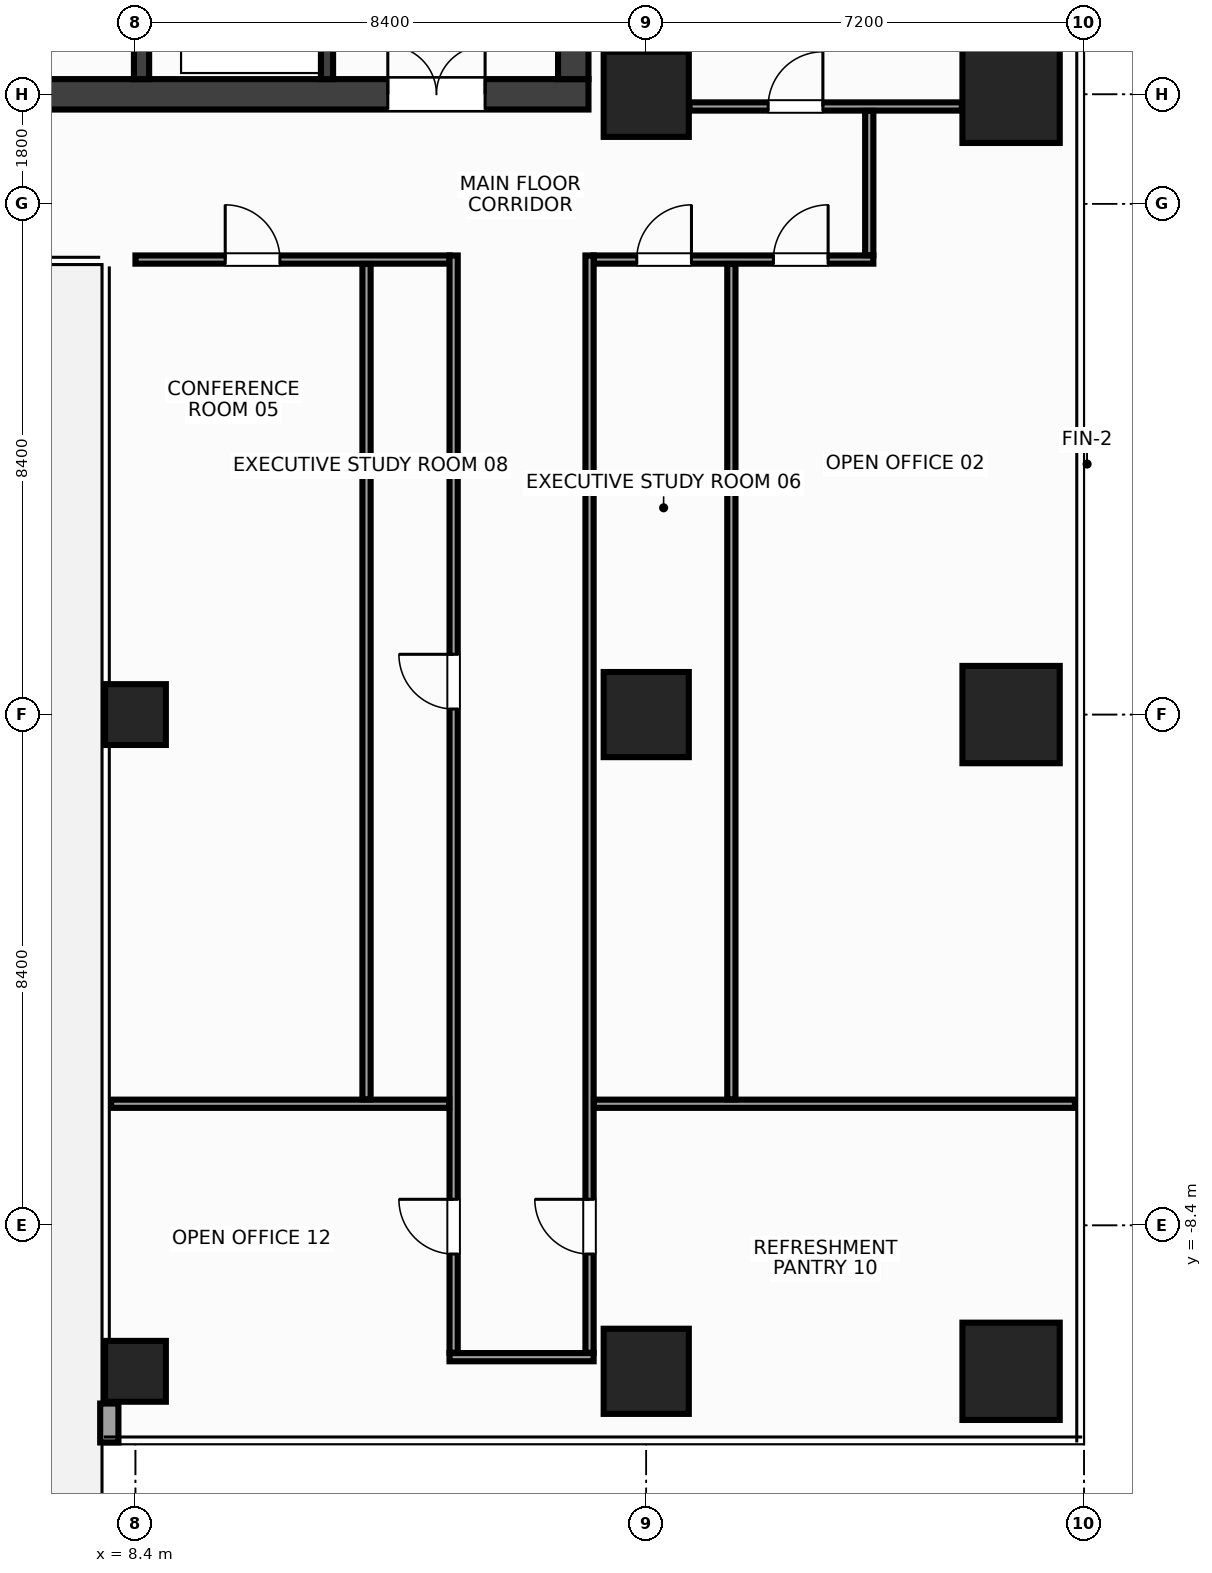
"""IFC4 building model, lengths in metres.
Left out: names, types, materials, properties, quantities, classifications, styles, units other than length and angle.
Written with IfcOpenShell. Run it as: python <this file> out.ifc"""

import sys

from ifc_helpers import new_model, si_unit, direction, frame, frame_2d, origin, origin_2d, place, context, subcontext, project, spatial, rectangle, hollow_rectangle, extrude, source, transform, mapped, element, fill, save


model = new_model("IFC4")
c1 = context("Model", 3, precision=1e-05, world=origin(), true_north=direction((0.0, 1.0)))
c2 = subcontext(c1, "Body", "Model", "MODEL_VIEW")
j1 = project(units=[si_unit("LENGTHUNIT", "METRE"), si_unit("PLANEANGLEUNIT", "RADIAN")], contexts=[c1])
p1 = place(None, origin())
s1 = spatial("IfcSite", under=j1, at=p1, CompositionType="ELEMENT")
p2 = place(p1, origin())
s2 = spatial("IfcBuilding", under=s1, at=p2, CompositionType="ELEMENT")
p3 = place(p2, frame((0.0, 0.0, 196.4)))
s3 = spatial("IfcBuildingStorey", under=s2, at=p3, CompositionType="ELEMENT", Elevation=196.4)
m1 = source(origin(), c2, "Body", "SweptSolid", [
    extrude(rectangle(XDim=31.7, YDim=0.5, at=frame_2d((15.85, 0.0))), origin(), (0.0, 0.0, 1.0), 3.6),
])
p4 = place(p3, frame((-15.85, 10.2, 0.0), z_axis=(0.0, 0.0, 1.0), x_axis=(1.0, 0.0, 0.0)))
e1 = element("IfcWall", 1, at=p4, inside=s3, PredefinedType="SHEAR", context=c2, shape_type="MappedRepresentation", body=[
    mapped(m1, transform((0.0, 0.0, 0.0), x_axis=(1.0, 0.0, 0.0), y_axis=(0.0, 1.0, 0.0), z_axis=(0.0, 0.0, 1.0), scale=1.0)),
])
p5 = place(p4, frame((1.7, 0.0, 0.0)))
e2 = element("IfcOpeningElement", 2, at=p5, cuts=e1, PredefinedType="OPENING", context=c2, shape_type="SweptSolid", body=[
    extrude(rectangle(XDim=1.6, YDim=2.15, at=frame_2d((0.8, 1.075))), frame((0.0, 0.262, 0.0), z_axis=(0.0, -1.0, 0.0), x_axis=(1.0, 0.0, 0.0)), (0.0, 0.0, 1.0), 0.524),
])
p6 = place(p4, frame((28.4, 0.0, 0.0)))
e3 = element("IfcOpeningElement", 3, at=p6, cuts=e1, PredefinedType="OPENING", context=c2, shape_type="SweptSolid", body=[
    extrude(rectangle(XDim=1.6, YDim=2.15, at=frame_2d((0.8, 1.075))), frame((0.0, 0.262, 0.0), z_axis=(0.0, -1.0, 0.0), x_axis=(1.0, 0.0, 0.0)), (0.0, 0.0, 1.0), 0.524),
])
p7 = place(p4, frame((15.1, 0.0, 0.0)))
e4 = element("IfcOpeningElement", 4, at=p7, cuts=e1, PredefinedType="OPENING", context=c2, shape_type="SweptSolid", body=[
    extrude(rectangle(XDim=1.5, YDim=2.2, at=frame_2d((0.75, 1.1))), frame((0.0, 0.262, 0.0), z_axis=(0.0, -1.0, 0.0), x_axis=(1.0, 0.0, 0.0)), (0.0, 0.0, 1.0), 0.524),
])
m2 = source(origin(), c2, "Body", "SweptSolid", [
    extrude(rectangle(XDim=13.1, YDim=0.5, at=frame_2d((6.55, 0.0))), origin(), (0.0, 0.0, 1.0), 3.6),
])
p8 = place(p3, frame((15.6, 10.45, 0.0), z_axis=(0.0, 0.0, 1.0), x_axis=(0.0, 1.0, 0.0)))
e5 = element("IfcWall", 5, at=p8, inside=s3, PredefinedType="SHEAR", context=c2, shape_type="MappedRepresentation", body=[
    mapped(m2, transform((0.0, 0.0, 0.0), x_axis=(1.0, 0.0, 0.0), y_axis=(0.0, 1.0, 0.0), z_axis=(0.0, 0.0, 1.0), scale=1.0)),
])
m3 = source(origin(), c2, "Body", "SweptSolid", [
    extrude(rectangle(XDim=13.1, YDim=0.25, at=frame_2d((6.55, 0.0))), origin(), (0.0, 0.0, 1.0), 3.6),
])
p9 = place(p3, frame((8.5, 10.45, 0.0), z_axis=(0.0, 0.0, 1.0), x_axis=(0.0, 1.0, 0.0)))
e6 = element("IfcWall", 6, at=p9, inside=s3, PredefinedType="SHEAR", context=c2, shape_type="MappedRepresentation", body=[
    mapped(m3, transform((0.0, 0.0, 0.0), x_axis=(1.0, 0.0, 0.0), y_axis=(0.0, 1.0, 0.0), z_axis=(0.0, 0.0, 1.0), scale=1.0)),
])
p10 = place(p9, frame((10.0, 0.0, 0.0)))
e7 = element("IfcOpeningElement", 7, at=p10, cuts=e6, PredefinedType="OPENING", context=c2, shape_type="SweptSolid", body=[
    extrude(rectangle(XDim=0.95, YDim=2.15, at=frame_2d((0.475, 1.075))), frame((0.0, 0.137, 0.0), z_axis=(0.0, -1.0, 0.0), x_axis=(1.0, 0.0, 0.0)), (0.0, 0.0, 1.0), 0.274),
])
m4 = source(origin(), c2, "Body", "SweptSolid", [
    extrude(rectangle(XDim=3.2, YDim=0.2, at=frame_2d((1.6, 0.0))), origin(), (0.0, 0.0, 1.0), 3.6),
])
p11 = place(p3, frame((11.55, 10.45, 0.0), z_axis=(0.0, 0.0, 1.0), x_axis=(0.0, 1.0, 0.0)))
e8 = element("IfcWall", 8, at=p11, inside=s3, PredefinedType="SHEAR", context=c2, shape_type="MappedRepresentation", body=[
    mapped(m4, transform((0.0, 0.0, 0.0), x_axis=(1.0, 0.0, 0.0), y_axis=(0.0, 1.0, 0.0), z_axis=(0.0, 0.0, 1.0), scale=1.0)),
])
p12 = place(p11, frame((0.9, 0.0, 0.0)))
e9 = element("IfcOpeningElement", 9, at=p12, cuts=e8, PredefinedType="OPENING", context=c2, shape_type="SweptSolid", body=[
    extrude(rectangle(XDim=1.1, YDim=2.15, at=frame_2d((0.55, 1.075))), frame((0.0, 0.112, 0.0), z_axis=(0.0, -1.0, 0.0), x_axis=(1.0, 0.0, 0.0)), (0.0, 0.0, 1.0), 0.224),
])
m5 = source(origin(), c2, "Body", "SweptSolid", [
    extrude(rectangle(XDim=1.4, YDim=1.4, at=origin_2d()), origin(), (0.0, 0.0, 1.0), 3.6),
])
for number, where, z_axis, x_axis in (
    (10, (16.8, -10.8, 0.0), (0.0, 0.0, 1.0), (1.0, 0.0, 0.0)),
    (11, (16.8, 0.0, 0.0), (0.0, 0.0, 1.0), (1.0, 0.0, 0.0)),
    (12, (16.8, 10.2, 0.0), (0.0, 0.0, 1.0), (1.0, 0.0, 0.0)),
):
    element("IfcColumn", number, at=place(p3, frame(where, z_axis=z_axis, x_axis=x_axis)), inside=s3, PredefinedType="COLUMN", context=c2, shape_type="MappedRepresentation", body=[
        mapped(m5, transform((0.0, 0.0, 0.0), x_axis=(1.0, 0.0, 0.0), y_axis=(0.0, 1.0, 0.0), z_axis=(0.0, 0.0, 1.0), scale=1.0)),
    ])
m6 = source(origin(), c2, "Body", "SweptSolid", [
    extrude(rectangle(XDim=1.6, YDim=1.6, at=origin_2d()), origin(), (0.0, 0.0, 1.0), 3.6),
])
for number, where, z_axis, x_axis in (
    (13, (22.8, -10.8, 0.0), (0.0, 0.0, 1.0), (1.0, 0.0, 0.0)),
    (14, (22.8, 0.0, 0.0), (0.0, 0.0, 1.0), (1.0, 0.0, 0.0)),
    (15, (22.8, 10.2, 0.0), (0.0, 0.0, 1.0), (1.0, 0.0, 0.0)),
):
    element("IfcColumn", number, at=place(p3, frame(where, z_axis=z_axis, x_axis=x_axis)), inside=s3, PredefinedType="COLUMN", context=c2, shape_type="MappedRepresentation", body=[
        mapped(m6, transform((0.0, 0.0, 0.0), x_axis=(1.0, 0.0, 0.0), y_axis=(0.0, 1.0, 0.0), z_axis=(0.0, 0.0, 1.0), scale=1.0)),
    ])
m7 = source(origin(), c2, "Body", "SweptSolid", [
    extrude(hollow_rectangle(XDim=1.0, YDim=1.0, WallThickness=0.045, at=origin_2d()), origin(), (0.0, 0.0, 1.0), 3.6),
])
for number, where, z_axis, x_axis in (
    (16, (8.4, 0.0, 0.0), (0.0, 0.0, 1.0), (1.0, 0.0, 0.0)),
    (17, (8.4, -10.8, 0.0), (0.0, 0.0, 1.0), (1.0, 0.0, 0.0)),
):
    element("IfcColumn", number, at=place(p3, frame(where, z_axis=z_axis, x_axis=x_axis)), inside=s3, PredefinedType="COLUMN", context=c2, shape_type="MappedRepresentation", body=[
        mapped(m7, transform((0.0, 0.0, 0.0), x_axis=(1.0, 0.0, 0.0), y_axis=(0.0, 1.0, 0.0), z_axis=(0.0, 0.0, 1.0), scale=1.0)),
    ])
m8 = source(origin(), c2, "Body", "SweptSolid", [
    extrude(rectangle(XDim=0.64, YDim=0.24, at=frame_2d((0.32, 0.0))), origin(), (0.0, 0.0, 1.0), 2.76),
])
p13 = place(p3, frame((7.97, -11.33, 0.0), z_axis=(0.0, 0.0, 1.0), x_axis=(0.0, -1.0, 0.0)))
e18 = element("IfcWall", 18, at=p13, inside=s3, PredefinedType="STANDARD", context=c2, shape_type="MappedRepresentation", body=[
    mapped(m8, transform((0.0, 0.0, 0.0), x_axis=(1.0, 0.0, 0.0), y_axis=(0.0, 1.0, 0.0), z_axis=(0.0, 0.0, 1.0), scale=1.0)),
])
m9 = source(origin(), c2, "Body", "SweptSolid", [
    extrude(rectangle(XDim=4.48, YDim=0.135, at=frame_2d((2.24, 0.0))), origin(), (0.0, 0.0, 1.0), 2.915),
])
p14 = place(p3, frame((17.51, 10.0, 0.0), z_axis=(0.0, 0.0, 1.0), x_axis=(1.0, 0.0, 0.0)))
e19 = element("IfcWall", 19, at=p14, inside=s3, PredefinedType="PARTITIONING", context=c2, shape_type="MappedRepresentation", body=[
    mapped(m9, transform((0.0, 0.0, 0.0), x_axis=(1.0, 0.0, 0.0), y_axis=(0.0, 1.0, 0.0), z_axis=(0.0, 0.0, 1.0), scale=1.0)),
])
p15 = place(p14, frame((1.295, 0.0, 0.0)))
e20 = element("IfcOpeningElement", 20, at=p15, cuts=e19, PredefinedType="OPENING", context=c2, shape_type="SweptSolid", body=[
    extrude(rectangle(XDim=0.9, YDim=2.15, at=frame_2d((0.45, 1.075))), frame((0.0, 0.08, 0.0), z_axis=(0.0, -1.0, 0.0), x_axis=(1.0, 0.0, 0.0)), (0.0, 0.0, 1.0), 0.159),
])
m10 = source(origin(), c2, "Body", "SweptSolid", [
    extrude(rectangle(XDim=5.165, YDim=0.135, at=frame_2d((2.583, 0.0))), origin(), (0.0, 0.0, 1.0), 3.38),
])
p16 = place(p3, frame((8.4, 7.482, 0.0), z_axis=(0.0, 0.0, 1.0), x_axis=(1.0, 0.0, 0.0)))
e21 = element("IfcWall", 21, at=p16, inside=s3, PredefinedType="PARTITIONING", context=c2, shape_type="MappedRepresentation", body=[
    mapped(m10, transform((0.0, 0.0, 0.0), x_axis=(1.0, 0.0, 0.0), y_axis=(0.0, 1.0, 0.0), z_axis=(0.0, 0.0, 1.0), scale=1.0)),
])
p17 = place(p16, frame((1.476, 0.0, 0.0)))
e22 = element("IfcOpeningElement", 22, at=p17, cuts=e21, PredefinedType="OPENING", context=c2, shape_type="SweptSolid", body=[
    extrude(rectangle(XDim=0.9, YDim=2.15, at=frame_2d((0.45, 1.075))), frame((0.0, 0.08, 0.0), z_axis=(0.0, -1.0, 0.0), x_axis=(1.0, 0.0, 0.0)), (0.0, 0.0, 1.0), 0.159),
])
m11 = source(origin(), c2, "Body", "SweptSolid", [
    extrude(rectangle(XDim=4.6, YDim=0.135, at=frame_2d((2.3, 0.0))), origin(), (0.0, 0.0, 1.0), 2.765),
])
p18 = place(p3, frame((15.935, 7.482, 0.0), z_axis=(0.0, 0.0, 1.0), x_axis=(1.0, 0.0, 0.0)))
e23 = element("IfcWall", 23, at=p18, inside=s3, PredefinedType="PARTITIONING", context=c2, shape_type="MappedRepresentation", body=[
    mapped(m11, transform((0.0, 0.0, 0.0), x_axis=(1.0, 0.0, 0.0), y_axis=(0.0, 1.0, 0.0), z_axis=(0.0, 0.0, 1.0), scale=1.0)),
])
p19 = place(p18, frame((2.956, 0.0, 0.0)))
e24 = element("IfcOpeningElement", 24, at=p19, cuts=e23, PredefinedType="OPENING", context=c2, shape_type="SweptSolid", body=[
    extrude(rectangle(XDim=0.9, YDim=2.15, at=frame_2d((0.45, 1.075))), frame((0.0, 0.08, 0.0), z_axis=(0.0, -1.0, 0.0), x_axis=(1.0, 0.0, 0.0)), (0.0, 0.0, 1.0), 0.159),
])
p20 = place(p18, frame((0.709, 0.0, 0.0)))
e25 = element("IfcOpeningElement", 25, at=p20, cuts=e23, PredefinedType="OPENING", context=c2, shape_type="SweptSolid", body=[
    extrude(rectangle(XDim=0.9, YDim=2.15, at=frame_2d((0.45, 1.075))), frame((0.0, 0.08, 0.0), z_axis=(0.0, -1.0, 0.0), x_axis=(1.0, 0.0, 0.0)), (0.0, 0.0, 1.0), 0.159),
])
m12 = source(origin(), c2, "Body", "SweptSolid", [
    extrude(rectangle(XDim=2.37, YDim=0.135, at=frame_2d((1.185, 0.0))), origin(), (0.0, 0.0, 1.0), 3.38),
])
p21 = place(p3, frame((13.565, -10.567, 0.0), z_axis=(0.0, 0.0, 1.0), x_axis=(1.0, 0.0, 0.0)))
e26 = element("IfcWall", 26, at=p21, inside=s3, PredefinedType="PARTITIONING", context=c2, shape_type="MappedRepresentation", body=[
    mapped(m12, transform((0.0, 0.0, 0.0), x_axis=(1.0, 0.0, 0.0), y_axis=(0.0, 1.0, 0.0), z_axis=(0.0, 0.0, 1.0), scale=1.0)),
])
m13 = source(origin(), c2, "Body", "SweptSolid", [
    extrude(rectangle(XDim=2.373, YDim=0.135, at=frame_2d((1.186, 0.0))), origin(), (0.0, 0.0, 1.0), 3.38),
])
p22 = place(p3, frame((20.468, 7.555, 0.0), z_axis=(0.0, 0.0, 1.0), x_axis=(0.0, 1.0, 0.0)))
e27 = element("IfcWall", 27, at=p22, inside=s3, PredefinedType="PARTITIONING", context=c2, shape_type="MappedRepresentation", body=[
    mapped(m13, transform((0.0, 0.0, 0.0), x_axis=(1.0, 0.0, 0.0), y_axis=(0.0, 1.0, 0.0), z_axis=(0.0, 0.0, 1.0), scale=1.0)),
])
m14 = source(origin(), c2, "Body", "SweptSolid", [
    extrude(rectangle(XDim=18.045, YDim=0.135, at=frame_2d((9.022, 0.0))), origin(), (0.0, 0.0, 1.0), 2.915),
])
p23 = place(p3, frame((13.633, -10.495, 0.0), z_axis=(0.0, 0.0, 1.0), x_axis=(0.0, 1.0, 0.0)))
e28 = element("IfcWall", 28, at=p23, inside=s3, PredefinedType="PARTITIONING", context=c2, shape_type="MappedRepresentation", body=[
    mapped(m14, transform((0.0, 0.0, 0.0), x_axis=(1.0, 0.0, 0.0), y_axis=(0.0, 1.0, 0.0), z_axis=(0.0, 0.0, 1.0), scale=1.0)),
])
p24 = place(p23, frame((10.586, 0.0, 0.0)))
e29 = element("IfcOpeningElement", 29, at=p24, cuts=e28, PredefinedType="OPENING", context=c2, shape_type="SweptSolid", body=[
    extrude(rectangle(XDim=0.9, YDim=2.15, at=frame_2d((0.45, 1.075))), frame((0.0, 0.08, 0.0), z_axis=(0.0, -1.0, 0.0), x_axis=(1.0, 0.0, 0.0)), (0.0, 0.0, 1.0), 0.159),
])
p25 = place(p23, frame((1.624, 0.0, 0.0)))
e30 = element("IfcOpeningElement", 30, at=p25, cuts=e28, PredefinedType="OPENING", context=c2, shape_type="SweptSolid", body=[
    extrude(rectangle(XDim=0.9, YDim=2.15, at=frame_2d((0.45, 1.075))), frame((0.0, 0.08, 0.0), z_axis=(0.0, -1.0, 0.0), x_axis=(1.0, 0.0, 0.0)), (0.0, 0.0, 1.0), 0.159),
])
p26 = place(p3, frame((15.867, -10.495, 0.0), z_axis=(0.0, 0.0, 1.0), x_axis=(0.0, 1.0, 0.0)))
e31 = element("IfcWall", 31, at=p26, inside=s3, PredefinedType="PARTITIONING", context=c2, shape_type="MappedRepresentation", body=[
    mapped(m14, transform((0.0, 0.0, 0.0), x_axis=(1.0, 0.0, 0.0), y_axis=(0.0, 1.0, 0.0), z_axis=(0.0, 0.0, 1.0), scale=1.0)),
])
p27 = place(p26, frame((1.624, 0.0, 0.0)))
e32 = element("IfcOpeningElement", 32, at=p27, cuts=e31, PredefinedType="OPENING", context=c2, shape_type="SweptSolid", body=[
    extrude(rectangle(XDim=0.9, YDim=2.15, at=frame_2d((0.45, 1.075))), frame((0.0, 0.08, 0.0), z_axis=(0.0, -1.0, 0.0), x_axis=(1.0, 0.0, 0.0)), (0.0, 0.0, 1.0), 0.159),
])
m15 = source(origin(), c2, "Body", "SweptSolid", [
    extrude(rectangle(XDim=5.56, YDim=0.135, at=frame_2d((2.78, 0.0))), origin(), (0.0, 0.0, 1.0), 2.765),
])
p28 = place(p3, frame((8.0, -6.4, 0.0), z_axis=(0.0, 0.0, 1.0), x_axis=(1.0, 0.0, 0.0)))
e33 = element("IfcWall", 33, at=p28, inside=s3, PredefinedType="PARTITIONING", context=c2, shape_type="MappedRepresentation", body=[
    mapped(m15, transform((0.0, 0.0, 0.0), x_axis=(1.0, 0.0, 0.0), y_axis=(0.0, 1.0, 0.0), z_axis=(0.0, 0.0, 1.0), scale=1.0)),
])
m16 = source(origin(), c2, "Body", "SweptSolid", [
    extrude(rectangle(XDim=7.91, YDim=0.135, at=frame_2d((3.955, 0.0))), origin(), (0.0, 0.0, 1.0), 2.765),
])
p29 = place(p3, frame((15.94, -6.4, 0.0), z_axis=(0.0, 0.0, 1.0), x_axis=(1.0, 0.0, 0.0)))
e34 = element("IfcWall", 34, at=p29, inside=s3, PredefinedType="PARTITIONING", context=c2, shape_type="MappedRepresentation", body=[
    mapped(m16, transform((0.0, 0.0, 0.0), x_axis=(1.0, 0.0, 0.0), y_axis=(0.0, 1.0, 0.0), z_axis=(0.0, 0.0, 1.0), scale=1.0)),
])
m17 = source(origin(), c2, "Body", "SweptSolid", [
    extrude(rectangle(XDim=13.737, YDim=0.135, at=frame_2d((6.869, 0.0))), origin(), (0.0, 0.0, 1.0), 2.915),
])
for number, where, z_axis, x_axis in (
    (35, (12.2, -6.327, 0.0), (0.0, 0.0, 1.0), (0.0, 1.0, 0.0)),
    (36, (18.2, -6.327, 0.0), (0.0, 0.0, 1.0), (0.0, 1.0, 0.0)),
):
    element("IfcWall", number, at=place(p3, frame(where, z_axis=z_axis, x_axis=x_axis)), inside=s3, PredefinedType="PARTITIONING", context=c2, shape_type="MappedRepresentation", body=[
        mapped(m17, transform((0.0, 0.0, 0.0), x_axis=(1.0, 0.0, 0.0), y_axis=(0.0, 1.0, 0.0), z_axis=(0.0, 0.0, 1.0), scale=1.0)),
    ])
m18 = source(origin(), c2, "Body", "SweptSolid", [
    extrude(rectangle(XDim=1.6, YDim=2.15, at=frame_2d((0.8, 1.075))), frame((0.0, 0.025, 0.0), z_axis=(0.0, -1.0, 0.0), x_axis=(1.0, 0.0, 0.0)), (0.0, 0.0, 1.0), 0.05),
])
p30 = place(p6, origin())
e37 = element("IfcDoor", 37, at=p30, inside=s3, OperationType="DOUBLE_DOOR_SINGLE_SWING", PredefinedType="DOOR", context=c2, shape_type="MappedRepresentation", body=[
    mapped(m18, transform((0.0, 0.0, 0.0), x_axis=(1.0, 0.0, 0.0), y_axis=(0.0, 1.0, 0.0), z_axis=(0.0, 0.0, 1.0), scale=1.0)),
])
fill(e3, e37)
m19 = source(origin(), c2, "Body", "SweptSolid", [
    extrude(rectangle(XDim=0.9, YDim=2.15, at=frame_2d((0.45, 1.075))), frame((0.0, 0.025, 0.0), z_axis=(0.0, -1.0, 0.0), x_axis=(1.0, 0.0, 0.0)), (0.0, 0.0, 1.0), 0.05),
])
p31 = place(p15, origin())
e38 = element("IfcDoor", 38, at=p31, inside=s3, OperationType="SINGLE_SWING_RIGHT", PredefinedType="DOOR", context=c2, shape_type="MappedRepresentation", body=[
    mapped(m19, transform((0.0, 0.0, 0.0), x_axis=(1.0, 0.0, 0.0), y_axis=(0.0, 1.0, 0.0), z_axis=(0.0, 0.0, 1.0), scale=1.0)),
])
fill(e20, e38)
p32 = place(p19, origin())
e39 = element("IfcDoor", 39, at=p32, inside=s3, OperationType="SINGLE_SWING_RIGHT", PredefinedType="DOOR", context=c2, shape_type="MappedRepresentation", body=[
    mapped(m19, transform((0.0, 0.0, 0.0), x_axis=(1.0, 0.0, 0.0), y_axis=(0.0, 1.0, 0.0), z_axis=(0.0, 0.0, 1.0), scale=1.0)),
])
fill(e24, e39)
p33 = place(p17, origin())
e40 = element("IfcDoor", 40, at=p33, inside=s3, OperationType="SINGLE_SWING_LEFT", PredefinedType="DOOR", context=c2, shape_type="MappedRepresentation", body=[
    mapped(m19, transform((0.0, 0.0, 0.0), x_axis=(1.0, 0.0, 0.0), y_axis=(0.0, 1.0, 0.0), z_axis=(0.0, 0.0, 1.0), scale=1.0)),
])
fill(e22, e40)
p34 = place(p20, origin())
e41 = element("IfcDoor", 41, at=p34, inside=s3, OperationType="SINGLE_SWING_RIGHT", PredefinedType="DOOR", context=c2, shape_type="MappedRepresentation", body=[
    mapped(m19, transform((0.0, 0.0, 0.0), x_axis=(1.0, 0.0, 0.0), y_axis=(0.0, 1.0, 0.0), z_axis=(0.0, 0.0, 1.0), scale=1.0)),
])
fill(e25, e41)
p35 = place(p24, origin())
e42 = element("IfcDoor", 42, at=p35, inside=s3, OperationType="SINGLE_SWING_RIGHT", PredefinedType="DOOR", context=c2, shape_type="MappedRepresentation", body=[
    mapped(m19, transform((0.0, 0.0, 0.0), x_axis=(1.0, 0.0, 0.0), y_axis=(0.0, 1.0, 0.0), z_axis=(0.0, 0.0, 1.0), scale=1.0)),
])
fill(e29, e42)
p36 = place(p27, origin())
e43 = element("IfcDoor", 43, at=p36, inside=s3, OperationType="SINGLE_SWING_RIGHT", PredefinedType="DOOR", context=c2, shape_type="MappedRepresentation", body=[
    mapped(m19, transform((0.0, 0.0, 0.0), x_axis=(1.0, 0.0, 0.0), y_axis=(0.0, 1.0, 0.0), z_axis=(0.0, 0.0, 1.0), scale=1.0)),
])
fill(e32, e43)
p37 = place(p25, origin())
e44 = element("IfcDoor", 44, at=p37, inside=s3, OperationType="SINGLE_SWING_RIGHT", PredefinedType="DOOR", context=c2, shape_type="MappedRepresentation", body=[
    mapped(m19, transform((0.0, 0.0, 0.0), x_axis=(1.0, 0.0, 0.0), y_axis=(0.0, 1.0, 0.0), z_axis=(0.0, 0.0, 1.0), scale=1.0)),
])
fill(e30, e44)
save(model, sys.argv[1])
